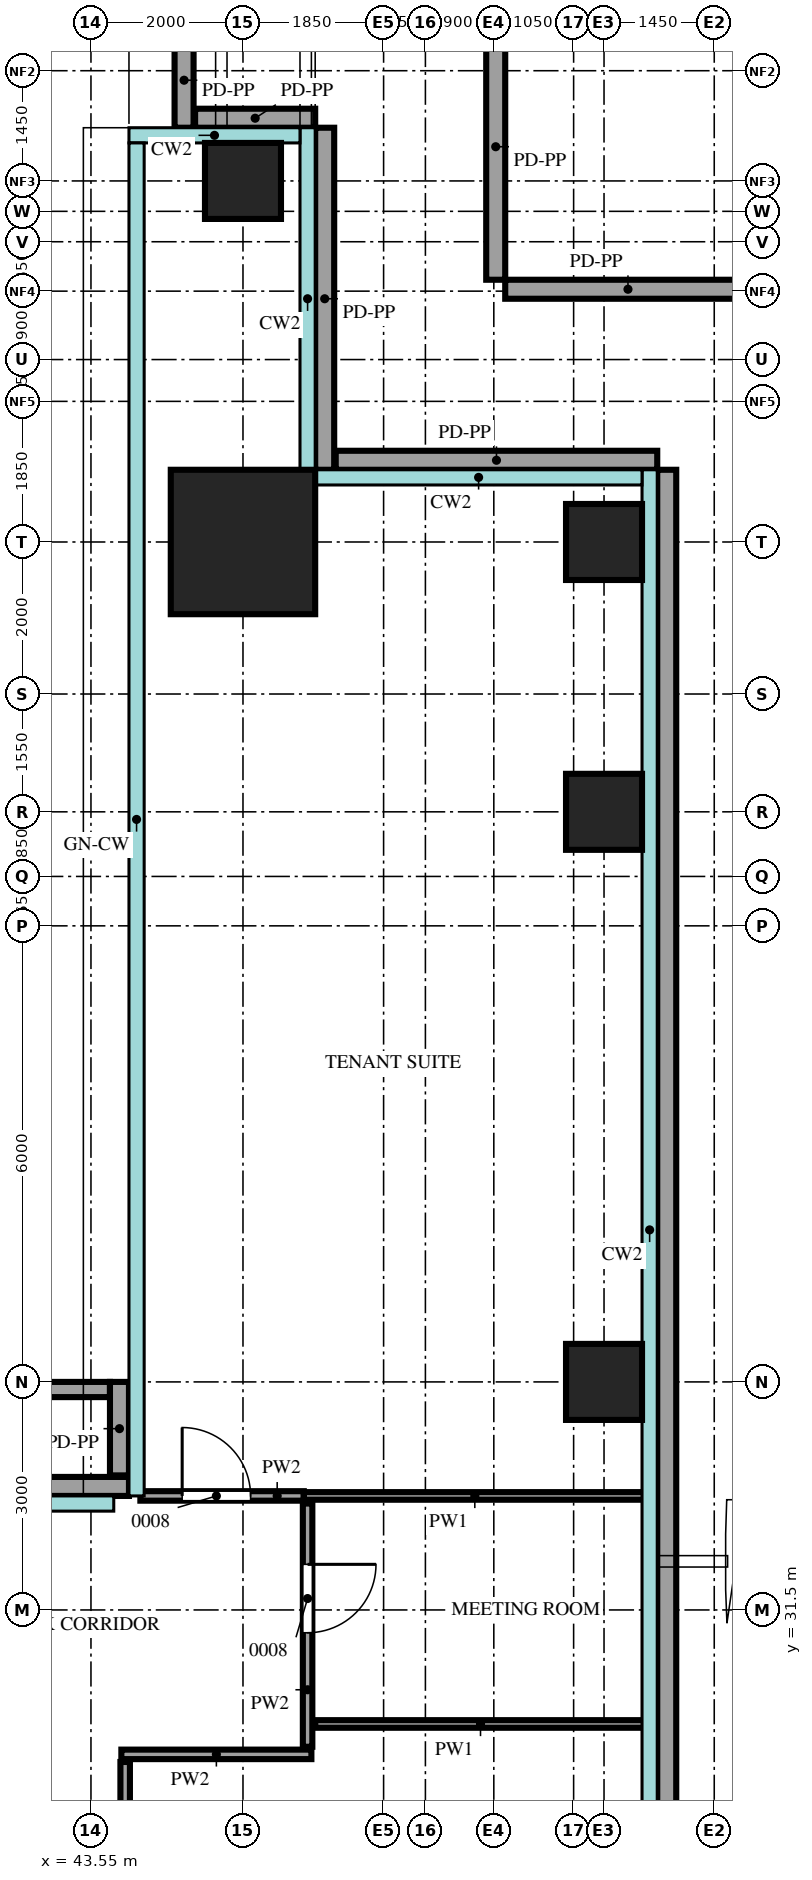
"""IFC4 building model, lengths in metres.
Left out: names, types, materials, properties, quantities, classifications, styles, units other than length and angle.
Written with IfcOpenShell. Run it as: python <this file> out.ifc"""

import sys

from ifc_helpers import new_model, si_unit, direction, frame, frame_2d, origin, origin_2d, place, context, subcontext, project, spatial, rectangle, extrude, source, transform, mapped, element, fill, save


model = new_model("IFC4")
c1 = context("Model", 3, precision=1e-05, world=origin(), true_north=direction((0.0, 1.0)))
c2 = subcontext(c1, "Body", "Model", "MODEL_VIEW")
j1 = project(units=[si_unit("LENGTHUNIT", "METRE"), si_unit("PLANEANGLEUNIT", "RADIAN")], contexts=[c1])
p1 = place(None, origin())
s1 = spatial("IfcSite", under=j1, at=p1, CompositionType="ELEMENT")
p2 = place(p1, origin())
s2 = spatial("IfcBuilding", under=s1, at=p2, CompositionType="ELEMENT")
p3 = place(p2, frame((0.0, 0.0, 164.7)))
s3 = spatial("IfcBuildingStorey", under=s2, at=p3, CompositionType="ELEMENT", Elevation=164.7)
m1 = source(origin(), c2, "Body", "SweptSolid", [
    extrude(rectangle(XDim=1.9, YDim=1.9, at=origin_2d()), origin(), (0.0, 0.0, 1.0), 4.0),
])
p4 = place(p3, frame((45.55, 45.55, 0.0), z_axis=(0.0, 0.0, 1.0), x_axis=(1.0, 0.0, 0.0)))
e1 = element("IfcColumn", 1, at=p4, inside=s3, PredefinedType="COLUMN", context=c2, shape_type="MappedRepresentation", body=[
    mapped(m1, transform((0.0, 0.0, 0.0))),
])
m2 = source(origin(), c2, "Body", "SweptSolid", [
    extrude(rectangle(XDim=1.0, YDim=1.0, at=origin_2d()), origin(), (0.0, 0.0, 1.0), 3.75),
])
for number, where, z_axis, x_axis in (
    (2, (50.3, 34.5, 0.0), (0.0, 0.0, 1.0), (1.0, 0.0, 0.0)),
    (3, (50.3, 42.0, 0.0), (0.0, 0.0, 1.0), (1.0, 0.0, 0.0)),
    (4, (50.3, 45.55, 0.0), (0.0, 0.0, 1.0), (1.0, 0.0, 0.0)),
    (5, (45.55, 50.3, 0.0), (0.0, 0.0, 1.0), (1.0, 0.0, 0.0)),
):
    element("IfcColumn", number, at=place(p3, frame(where, z_axis=z_axis, x_axis=x_axis)), inside=s3, PredefinedType="COLUMN", context=c2, shape_type="MappedRepresentation", body=[
        mapped(m2, transform((0.0, 0.0, 0.0))),
    ])
m3 = source(origin(), c2, "Body", "SweptSolid", [
    extrude(rectangle(XDim=12.6, YDim=0.2, at=frame_2d((6.3, 0.0))), origin(), (0.0, 0.0, 1.0), 1.1),
])
p5 = place(p3, frame((31.2, 34.4, 0.0), z_axis=(0.0, 0.0, 1.0), x_axis=(1.0, 0.0, 0.0)))
e6 = element("IfcWall", 6, at=p5, inside=s3, PredefinedType="SOLIDWALL", context=c2, shape_type="MappedRepresentation", body=[
    mapped(m3, transform((0.0, 0.0, 0.0))),
])
m4 = source(origin(), c2, "Body", "SweptSolid", [
    extrude(rectangle(XDim=1.25, YDim=0.25, at=frame_2d((0.625, 0.0))), origin(), (0.0, 0.0, 1.0), 1.1),
])
p6 = place(p3, frame((44.775, 52.25, 0.0), z_axis=(0.0, 0.0, 1.0), x_axis=(0.0, -1.0, 0.0)))
e7 = element("IfcWall", 7, at=p6, inside=s3, PredefinedType="SOLIDWALL", context=c2, shape_type="MappedRepresentation", body=[
    mapped(m4, transform((0.0, 0.0, 0.0))),
])
m5 = source(origin(), c2, "Body", "SweptSolid", [
    extrude(rectangle(XDim=1.58, YDim=0.25, at=frame_2d((0.79, 0.0))), origin(), (0.0, 0.0, 1.0), 1.1),
])
p7 = place(p3, frame((44.92, 51.125, 0.0), z_axis=(0.0, 0.0, 1.0), x_axis=(1.0, 0.0, 0.0)))
e8 = element("IfcWall", 8, at=p7, inside=s3, PredefinedType="SOLIDWALL", context=c2, shape_type="MappedRepresentation", body=[
    mapped(m5, transform((0.0, 0.0, 0.0))),
])
m6 = source(origin(), c2, "Body", "SweptSolid", [
    extrude(rectangle(XDim=4.5, YDim=0.25, at=frame_2d((2.25, 0.0))), origin(), (0.0, 0.0, 1.0), 1.1),
])
p8 = place(p3, frame((46.625, 51.0, 0.0), z_axis=(0.0, 0.0, 1.0), x_axis=(0.0, -1.0, 0.0)))
e9 = element("IfcWall", 9, at=p8, inside=s3, PredefinedType="SOLIDWALL", context=c2, shape_type="MappedRepresentation", body=[
    mapped(m6, transform((0.0, 0.0, 0.0))),
])
m7 = source(origin(), c2, "Body", "SweptSolid", [
    extrude(rectangle(XDim=4.23, YDim=0.25, at=frame_2d((2.115, 0.0))), origin(), (0.0, 0.0, 1.0), 1.1),
])
p9 = place(p3, frame((46.77, 46.625, 0.0), z_axis=(0.0, 0.0, 1.0), x_axis=(1.0, 0.0, 0.0)))
e10 = element("IfcWall", 10, at=p9, inside=s3, PredefinedType="SOLIDWALL", context=c2, shape_type="MappedRepresentation", body=[
    mapped(m7, transform((0.0, 0.0, 0.0))),
])
m8 = source(origin(), c2, "Body", "SweptSolid", [
    extrude(rectangle(XDim=39.0, YDim=0.25, at=frame_2d((19.5, 0.0))), origin(), (0.0, 0.0, 1.0), 1.1),
])
p10 = place(p3, frame((51.125, 46.5, 0.0), z_axis=(0.0, 0.0, 1.0), x_axis=(0.0, -1.0, 0.0)))
e11 = element("IfcWall", 11, at=p10, inside=s3, PredefinedType="SOLIDWALL", context=c2, shape_type="MappedRepresentation", body=[
    mapped(m8, transform((0.0, 0.0, 0.0))),
])
m9 = source(origin(), c2, "Body", "SweptSolid", [
    extrude(rectangle(XDim=3.23, YDim=0.25, at=frame_2d((1.615, 0.0))), origin(), (0.0, 0.0, 1.0), 1.1),
])
p11 = place(p3, frame((52.23, 48.875, 0.0), z_axis=(0.0, 0.0, 1.0), x_axis=(-1.0, 0.0, 0.0)))
e12 = element("IfcWall", 12, at=p11, inside=s3, PredefinedType="SOLIDWALL", context=c2, shape_type="MappedRepresentation", body=[
    mapped(m9, transform((0.0, 0.0, 0.0))),
])
m10 = source(origin(), c2, "Body", "SweptSolid", [
    extrude(rectangle(XDim=3.5, YDim=0.25, at=frame_2d((1.75, 0.0))), origin(), (0.0, 0.0, 1.0), 1.1),
])
p12 = place(p3, frame((48.875, 49.0, 0.0), z_axis=(0.0, 0.0, 1.0), x_axis=(0.0, 1.0, 0.0)))
e13 = element("IfcWall", 13, at=p12, inside=s3, PredefinedType="SOLIDWALL", context=c2, shape_type="MappedRepresentation", body=[
    mapped(m10, transform((0.0, 0.0, 0.0))),
])
m11 = source(origin(), c2, "Body", "SweptSolid", [
    extrude(rectangle(XDim=12.83, YDim=0.25, at=frame_2d((6.415, 0.0))), origin(), (0.0, 0.0, 1.0), 1.1),
])
p13 = place(p3, frame((31.22, 33.125, 0.0), z_axis=(0.0, 0.0, 1.0), x_axis=(1.0, 0.0, 0.0)))
e14 = element("IfcWall", 14, at=p13, inside=s3, PredefinedType="SOLIDWALL", context=c2, shape_type="MappedRepresentation", body=[
    mapped(m11, transform((0.0, 0.0, 0.0))),
])
m12 = source(origin(), c2, "Body", "SweptSolid", [
    extrude(rectangle(XDim=1.23, YDim=0.25, at=frame_2d((0.615, 0.0))), origin(), (0.0, 0.0, 1.0), 1.1),
])
p14 = place(p3, frame((43.925, 33.27, 0.0), z_axis=(0.0, 0.0, 1.0), x_axis=(0.0, 1.0, 0.0)))
e15 = element("IfcWall", 15, at=p14, inside=s3, PredefinedType="SOLIDWALL", context=c2, shape_type="MappedRepresentation", body=[
    mapped(m12, transform((0.0, 0.0, 0.0))),
])
m13 = source(origin(), c2, "Body", "SweptSolid", [
    extrude(rectangle(XDim=8.4, YDim=0.125, at=frame_2d((4.2, 0.0))), origin(), (0.0, 0.0, 1.0), 3.8),
])
p15 = place(p3, frame((44.0, 21.1, 0.0), z_axis=(0.0, 0.0, 1.0), x_axis=(0.0, 1.0, 0.0)))
e16 = element("IfcWall", 16, at=p15, inside=s3, PredefinedType="PARTITIONING", context=c2, shape_type="MappedRepresentation", body=[
    mapped(m13, transform((0.0, 0.0, 0.0))),
])
m14 = source(origin(), c2, "Body", "SweptSolid", [
    extrude(rectangle(XDim=0.9, YDim=2.1, at=frame_2d((0.45, 1.05))), frame((0.0, 0.073, 0.0), z_axis=(0.0, -1.0, 0.0), x_axis=(1.0, 0.0, 0.0)), (0.0, 0.0, 1.0), 0.145),
])
p16 = place(p15, frame((1.5, 0.0, 0.0)))
e17 = element("IfcOpeningElement", 17, at=p16, cuts=e16, PredefinedType="OPENING", context=c2, shape_type="MappedRepresentation", body=[
    mapped(m14, transform((0.0, 0.0, 0.0))),
])
p17 = place(p15, frame((5.45, 0.0, 0.0)))
e18 = element("IfcOpeningElement", 18, at=p17, cuts=e16, PredefinedType="OPENING", context=c2, shape_type="MappedRepresentation", body=[
    mapped(m14, transform((0.0, 0.0, 0.0))),
])
m15 = source(origin(), c2, "Body", "SweptSolid", [
    extrude(rectangle(XDim=2.5, YDim=0.125, at=frame_2d((1.25, 0.0))), origin(), (0.0, 0.0, 1.0), 3.8),
])
p18 = place(p3, frame((43.95, 29.6, 0.0), z_axis=(0.0, 0.0, 1.0), x_axis=(1.0, 0.0, 0.0)))
e19 = element("IfcWall", 19, at=p18, inside=s3, PredefinedType="PARTITIONING", context=c2, shape_type="MappedRepresentation", body=[
    mapped(m15, transform((0.0, 0.0, 0.0))),
])
m16 = source(origin(), c2, "Body", "SweptSolid", [
    extrude(rectangle(XDim=3.2, YDim=0.125, at=frame_2d((1.6, 0.0))), origin(), (0.0, 0.0, 1.0), 3.8),
])
p19 = place(p3, frame((46.4, 29.7, 0.0), z_axis=(0.0, 0.0, 1.0), x_axis=(0.0, 1.0, 0.0)))
e20 = element("IfcWall", 20, at=p19, inside=s3, PredefinedType="PARTITIONING", context=c2, shape_type="MappedRepresentation", body=[
    mapped(m16, transform((0.0, 0.0, 0.0))),
])
p20 = place(p19, frame((1.5, 0.0, 0.0)))
e21 = element("IfcOpeningElement", 21, at=p20, cuts=e20, PredefinedType="OPENING", context=c2, shape_type="MappedRepresentation", body=[
    mapped(m14, transform((0.0, 0.0, 0.0))),
])
m17 = source(origin(), c2, "Body", "SweptSolid", [
    extrude(rectangle(XDim=4.35, YDim=0.1, at=frame_2d((2.175, 0.0))), origin(), (0.0, 0.0, 1.0), 3.8),
])
p21 = place(p3, frame((46.5, 30.0, 0.0), z_axis=(0.0, 0.0, 1.0), x_axis=(1.0, 0.0, 0.0)))
e22 = element("IfcWall", 22, at=p21, inside=s3, PredefinedType="PARTITIONING", context=c2, shape_type="MappedRepresentation", body=[
    mapped(m17, transform((0.0, 0.0, 0.0))),
])
m18 = source(origin(), c2, "Body", "SweptSolid", [
    extrude(rectangle(XDim=2.15, YDim=0.125, at=frame_2d((1.075, 0.0))), origin(), (0.0, 0.0, 1.0), 3.8),
])
p22 = place(p3, frame((44.2, 33.0, 0.0), z_axis=(0.0, 0.0, 1.0), x_axis=(1.0, 0.0, 0.0)))
e23 = element("IfcWall", 23, at=p22, inside=s3, PredefinedType="PARTITIONING", context=c2, shape_type="MappedRepresentation", body=[
    mapped(m18, transform((0.0, 0.0, 0.0))),
])
p23 = place(p22, frame((0.55, 0.0, 0.0)))
e24 = element("IfcOpeningElement", 24, at=p23, cuts=e23, PredefinedType="OPENING", context=c2, shape_type="MappedRepresentation", body=[
    mapped(m14, transform((0.0, 0.0, 0.0))),
])
m19 = source(origin(), c2, "Body", "SweptSolid", [
    extrude(rectangle(XDim=4.5, YDim=0.1, at=frame_2d((2.25, 0.0))), origin(), (0.0, 0.0, 1.0), 3.8),
])
p24 = place(p3, frame((46.35, 33.0, 0.0), z_axis=(0.0, 0.0, 1.0), x_axis=(1.0, 0.0, 0.0)))
e25 = element("IfcWall", 25, at=p24, inside=s3, PredefinedType="PARTITIONING", context=c2, shape_type="MappedRepresentation", body=[
    mapped(m19, transform((0.0, 0.0, 0.0))),
])
m20 = source(origin(), c2, "Body", "SweptSolid", [
    extrude(rectangle(XDim=0.9, YDim=2.1, at=frame_2d((0.45, 1.05))), frame((0.0, 0.025, 0.0), z_axis=(0.0, -1.0, 0.0), x_axis=(1.0, 0.0, 0.0)), (0.0, 0.0, 1.0), 0.05),
])
p25 = place(p23, origin())
e26 = element("IfcDoor", 26, at=p25, inside=s3, OperationType="SINGLE_SWING_RIGHT", PredefinedType="DOOR", context=c2, shape_type="MappedRepresentation", body=[
    mapped(m20, transform((0.0, 0.0, 0.0))),
])
fill(e24, e26)
p26 = place(p20, origin())
e27 = element("IfcDoor", 27, at=p26, inside=s3, OperationType="SINGLE_SWING_RIGHT", PredefinedType="DOOR", context=c2, shape_type="MappedRepresentation", body=[
    mapped(m20, transform((0.0, 0.0, 0.0))),
])
fill(e21, e27)
save(model, sys.argv[1])
